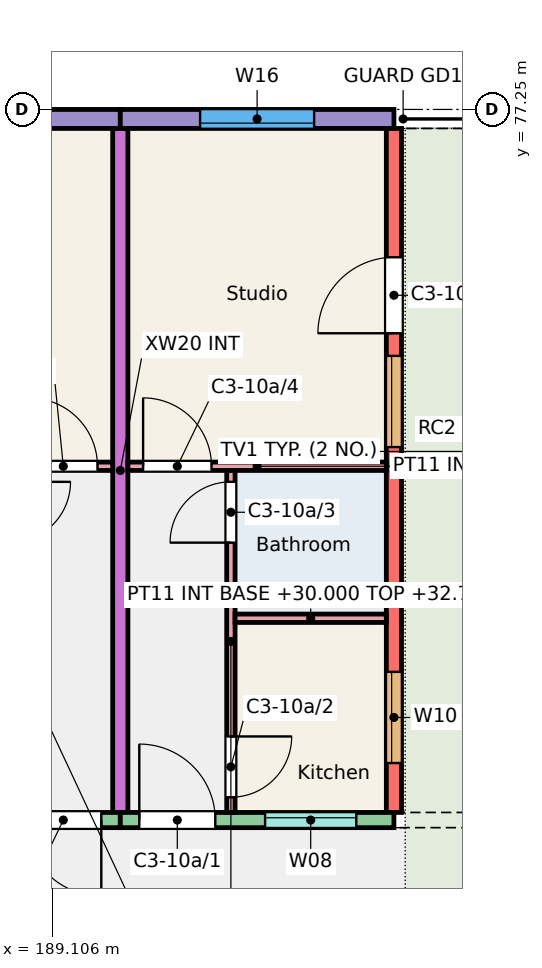
"""IFC4 building model, lengths in metres.
Left out: names, types, materials, properties, quantities, classifications, styles, units other than length and angle.
Written with IfcOpenShell. Run it as: python <this file> out.ifc"""

import sys

from ifc_helpers import new_model, si_unit, direction, frame, frame_2d, origin, place, context, subcontext, project, spatial, rectangle, extrude, element, fill, save


model = new_model("IFC4")
c1 = context("Model", 3, precision=1e-05, world=origin(), true_north=direction((0.0, 1.0)))
c2 = subcontext(c1, "Body", "Model", "MODEL_VIEW")
j1 = project(units=[si_unit("LENGTHUNIT", "METRE"), si_unit("PLANEANGLEUNIT", "RADIAN")], contexts=[c1])
p1 = place(None, origin())
s1 = spatial("IfcSite", under=j1, at=p1, CompositionType="ELEMENT")
p2 = place(p1, origin())
s2 = spatial("IfcBuilding", under=s1, at=p2, CompositionType="ELEMENT")
p3 = place(p2, frame((0.0, 0.0, 30.0)))
s3 = spatial("IfcBuildingStorey", under=s2, at=p3, CompositionType="ELEMENT", Elevation=30.0)
p4 = place(p3, frame((190.0, 68.0, 0.0), z_axis=(0.0, 0.0, 1.0), x_axis=(0.0, 1.0, 0.0)))
e1 = element("IfcWall", 1, at=p4, inside=s3, PredefinedType="SHEAR", context=c2, shape_type="SweptSolid", body=[
    extrude(rectangle(XDim=9.0, YDim=0.2, at=frame_2d((4.5, 0.0))), origin(), (0.0, 0.0, 1.0), 3.0),
])
p5 = place(p3, frame((193.6, 68.0, 0.0), z_axis=(0.0, 0.0, 1.0), x_axis=(0.0, 1.0, 0.0)))
e2 = element("IfcWall", 2, at=p5, inside=s3, PredefinedType="SHEAR", context=c2, shape_type="SweptSolid", body=[
    extrude(rectangle(XDim=9.0, YDim=0.2, at=frame_2d((4.5, 0.0))), origin(), (0.0, 0.0, 1.0), 3.0),
])
p6 = place(p5, frame((0.65, 0.0, 0.9)))
e3 = element("IfcOpeningElement", 3, at=p6, cuts=e2, PredefinedType="OPENING", context=c2, shape_type="SweptSolid", body=[
    extrude(rectangle(XDim=1.2, YDim=1.5, at=frame_2d((0.6, 0.75))), frame((0.0, 0.11, 0.0), z_axis=(0.0, -1.0, 0.0), x_axis=(1.0, 0.0, 0.0)), (0.0, 0.0, 1.0), 0.22),
])
p7 = place(p5, frame((4.808, 0.0, 0.9)))
e4 = element("IfcOpeningElement", 4, at=p7, cuts=e2, PredefinedType="OPENING", context=c2, shape_type="SweptSolid", body=[
    extrude(rectangle(XDim=1.2, YDim=1.5, at=frame_2d((0.6, 0.75))), frame((0.0, 0.11, 0.0), z_axis=(0.0, -1.0, 0.0), x_axis=(1.0, 0.0, 0.0)), (0.0, 0.0, 1.0), 0.22),
])
p8 = place(p5, frame((6.305, 0.0, 0.0)))
e5 = element("IfcOpeningElement", 5, at=p8, cuts=e2, PredefinedType="OPENING", context=c2, shape_type="SweptSolid", body=[
    extrude(rectangle(XDim=1.0, YDim=2.1, at=frame_2d((0.5, 1.05))), frame((0.0, 0.11, 0.0), z_axis=(0.0, -1.0, 0.0), x_axis=(1.0, 0.0, 0.0)), (0.0, 0.0, 1.0), 0.22),
])
p9 = place(p3, frame((186.4, 77.125, 0.0), z_axis=(0.0, 0.0, 1.0), x_axis=(1.0, 0.0, 0.0)))
e6 = element("IfcWall", 6, at=p9, inside=s3, PredefinedType="SOLIDWALL", context=c2, shape_type="SweptSolid", body=[
    extrude(rectangle(XDim=3.6, YDim=0.25, at=frame_2d((1.8, 0.0))), origin(), (0.0, 0.0, 1.0), 3.0),
])
p10 = place(p9, frame((1.062, 0.0, 0.9)))
e7 = element("IfcOpeningElement", 7, at=p10, cuts=e6, PredefinedType="OPENING", context=c2, shape_type="SweptSolid", body=[
    extrude(rectangle(XDim=1.5, YDim=1.5, at=frame_2d((0.75, 0.75))), frame((0.0, 0.135, 0.0), z_axis=(0.0, -1.0, 0.0), x_axis=(1.0, 0.0, 0.0)), (0.0, 0.0, 1.0), 0.27),
])
p11 = place(p3, frame((186.4, 67.9, 0.0), z_axis=(0.0, 0.0, 1.0), x_axis=(1.0, 0.0, 0.0)))
e8 = element("IfcWall", 8, at=p11, inside=s3, PredefinedType="SOLIDWALL", context=c2, shape_type="SweptSolid", body=[
    extrude(rectangle(XDim=3.6, YDim=0.2, at=frame_2d((1.8, 0.0))), origin(), (0.0, 0.0, 1.0), 3.0),
])
p12 = place(p11, frame((0.508, 0.0, 1.1)))
e9 = element("IfcOpeningElement", 9, at=p12, cuts=e8, PredefinedType="OPENING", context=c2, shape_type="SweptSolid", body=[
    extrude(rectangle(XDim=1.2, YDim=1.3, at=frame_2d((0.6, 0.65))), frame((0.0, 0.11, 0.0), z_axis=(0.0, -1.0, 0.0), x_axis=(1.0, 0.0, 0.0)), (0.0, 0.0, 1.0), 0.22),
])
p13 = place(p11, frame((2.35, 0.0, 0.0)))
e10 = element("IfcOpeningElement", 10, at=p13, cuts=e8, PredefinedType="OPENING", context=c2, shape_type="SweptSolid", body=[
    extrude(rectangle(XDim=1.0, YDim=2.1, at=frame_2d((0.5, 1.05))), frame((0.0, 0.11, 0.0), z_axis=(0.0, -1.0, 0.0), x_axis=(1.0, 0.0, 0.0)), (0.0, 0.0, 1.0), 0.22),
])
p14 = place(p3, frame((190.0, 77.125, 0.0), z_axis=(0.0, 0.0, 1.0), x_axis=(1.0, 0.0, 0.0)))
e11 = element("IfcWall", 11, at=p14, inside=s3, PredefinedType="SOLIDWALL", context=c2, shape_type="SweptSolid", body=[
    extrude(rectangle(XDim=3.6, YDim=0.25, at=frame_2d((1.8, 0.0))), origin(), (0.0, 0.0, 1.0), 3.0),
])
p15 = place(p14, frame((1.05, 0.0, 0.9)))
e12 = element("IfcOpeningElement", 12, at=p15, cuts=e11, PredefinedType="OPENING", context=c2, shape_type="SweptSolid", body=[
    extrude(rectangle(XDim=1.5, YDim=1.5, at=frame_2d((0.75, 0.75))), frame((0.0, 0.135, 0.0), z_axis=(0.0, -1.0, 0.0), x_axis=(1.0, 0.0, 0.0)), (0.0, 0.0, 1.0), 0.27),
])
p16 = place(p3, frame((190.0, 67.9, 0.0), z_axis=(0.0, 0.0, 1.0), x_axis=(1.0, 0.0, 0.0)))
e13 = element("IfcWall", 13, at=p16, inside=s3, PredefinedType="SOLIDWALL", context=c2, shape_type="SweptSolid", body=[
    extrude(rectangle(XDim=3.6, YDim=0.2, at=frame_2d((1.8, 0.0))), origin(), (0.0, 0.0, 1.0), 3.0),
])
p17 = place(p16, frame((1.905, 0.0, 1.1)))
e14 = element("IfcOpeningElement", 14, at=p17, cuts=e13, PredefinedType="OPENING", context=c2, shape_type="SweptSolid", body=[
    extrude(rectangle(XDim=1.2, YDim=1.3, at=frame_2d((0.6, 0.65))), frame((0.0, 0.11, 0.0), z_axis=(0.0, -1.0, 0.0), x_axis=(1.0, 0.0, 0.0)), (0.0, 0.0, 1.0), 0.22),
])
p18 = place(p16, frame((0.25, 0.0, 0.0)))
e15 = element("IfcOpeningElement", 15, at=p18, cuts=e13, PredefinedType="OPENING", context=c2, shape_type="SweptSolid", body=[
    extrude(rectangle(XDim=1.0, YDim=2.1, at=frame_2d((0.5, 1.05))), frame((0.0, 0.11, 0.0), z_axis=(0.0, -1.0, 0.0), x_axis=(1.0, 0.0, 0.0)), (0.0, 0.0, 1.0), 0.22),
])
p19 = place(p3, frame((191.455, 68.0, 0.0), z_axis=(0.0, 0.0, 1.0), x_axis=(0.0, 1.0, 0.0)))
e16 = element("IfcWall", 16, at=p19, inside=s3, PredefinedType="PARTITIONING", context=c2, shape_type="SweptSolid", body=[
    extrude(rectangle(XDim=4.5, YDim=0.11, at=frame_2d((2.25, 0.0))), origin(), (0.0, 0.0, 1.0), 2.75),
])
p20 = place(p19, frame((0.2, 0.0, 0.0)))
e17 = element("IfcOpeningElement", 17, at=p20, cuts=e16, PredefinedType="OPENING", context=c2, shape_type="SweptSolid", body=[
    extrude(rectangle(XDim=0.8, YDim=2.1, at=frame_2d((0.4, 1.05))), frame((0.0, 0.065, 0.0), z_axis=(0.0, -1.0, 0.0), x_axis=(1.0, 0.0, 0.0)), (0.0, 0.0, 1.0), 0.13),
])
p21 = place(p19, frame((3.55, 0.0, 0.0)))
e18 = element("IfcOpeningElement", 18, at=p21, cuts=e16, PredefinedType="OPENING", context=c2, shape_type="SweptSolid", body=[
    extrude(rectangle(XDim=0.8, YDim=2.1, at=frame_2d((0.4, 1.05))), frame((0.0, 0.065, 0.0), z_axis=(0.0, -1.0, 0.0), x_axis=(1.0, 0.0, 0.0)), (0.0, 0.0, 1.0), 0.13),
])
p22 = place(p3, frame((191.51, 70.555, 0.0), z_axis=(0.0, 0.0, 1.0), x_axis=(1.0, 0.0, 0.0)))
e19 = element("IfcWall", 19, at=p22, inside=s3, PredefinedType="PARTITIONING", context=c2, shape_type="SweptSolid", body=[
    extrude(rectangle(XDim=1.99, YDim=0.11, at=frame_2d((0.995, 0.0))), origin(), (0.0, 0.0, 1.0), 2.75),
])
p23 = place(p3, frame((190.1, 72.555, 0.0), z_axis=(0.0, 0.0, 1.0), x_axis=(1.0, 0.0, 0.0)))
e20 = element("IfcWall", 20, at=p23, inside=s3, PredefinedType="PARTITIONING", context=c2, shape_type="SweptSolid", body=[
    extrude(rectangle(XDim=3.4, YDim=0.11, at=frame_2d((1.7, 0.0))), origin(), (0.0, 0.0, 1.0), 2.75),
])
p24 = place(p23, frame((0.2, 0.0, 0.0)))
e21 = element("IfcOpeningElement", 21, at=p24, cuts=e20, PredefinedType="OPENING", context=c2, shape_type="SweptSolid", body=[
    extrude(rectangle(XDim=0.9, YDim=2.1, at=frame_2d((0.45, 1.05))), frame((0.0, 0.065, 0.0), z_axis=(0.0, -1.0, 0.0), x_axis=(1.0, 0.0, 0.0)), (0.0, 0.0, 1.0), 0.13),
])
p25 = place(p3, frame((186.525, 72.555, 0.0), z_axis=(0.0, 0.0, 1.0), x_axis=(1.0, 0.0, 0.0)))
e22 = element("IfcWall", 22, at=p25, inside=s3, PredefinedType="PARTITIONING", context=c2, shape_type="SweptSolid", body=[
    extrude(rectangle(XDim=3.375, YDim=0.11, at=frame_2d((1.688, 0.0))), origin(), (0.0, 0.0, 1.0), 2.8),
])
p26 = place(p25, frame((2.275, 0.0, 0.0)))
e23 = element("IfcOpeningElement", 23, at=p26, cuts=e22, PredefinedType="OPENING", context=c2, shape_type="SweptSolid", body=[
    extrude(rectangle(XDim=0.9, YDim=2.1, at=frame_2d((0.45, 1.05))), frame((0.0, 0.065, 0.0), z_axis=(0.0, -1.0, 0.0), x_axis=(1.0, 0.0, 0.0)), (0.0, 0.0, 1.0), 0.13),
])
p27 = place(p17, origin())
e24 = element("IfcWindow", 24, at=p27, inside=s3, PartitioningType="SINGLE_PANEL", PredefinedType="WINDOW", context=c2, shape_type="SweptSolid", body=[
    extrude(rectangle(XDim=1.2, YDim=1.3, at=frame_2d((0.6, 0.65))), frame((0.0, 0.06, 0.0), z_axis=(0.0, -1.0, 0.0), x_axis=(1.0, 0.0, 0.0)), (0.0, 0.0, 1.0), 0.06),
])
fill(e14, e24)
p28 = place(p15, origin())
e25 = element("IfcWindow", 25, at=p28, inside=s3, PartitioningType="SINGLE_PANEL", PredefinedType="WINDOW", context=c2, shape_type="SweptSolid", body=[
    extrude(rectangle(XDim=1.5, YDim=1.5, at=frame_2d((0.75, 0.75))), frame((0.0, -0.025, 0.0), z_axis=(0.0, -1.0, 0.0), x_axis=(1.0, 0.0, 0.0)), (0.0, 0.0, 1.0), 0.06),
])
fill(e12, e25)
p29 = place(p6, origin())
e26 = element("IfcWindow", 26, at=p29, inside=s3, PartitioningType="SINGLE_PANEL", PredefinedType="WINDOW", context=c2, shape_type="SweptSolid", body=[
    extrude(rectangle(XDim=1.2, YDim=1.5, at=frame_2d((0.6, 0.75))), frame((0.0, 0.06, 0.0), z_axis=(0.0, -1.0, 0.0), x_axis=(1.0, 0.0, 0.0)), (0.0, 0.0, 1.0), 0.06),
])
fill(e3, e26)
p30 = place(p7, origin())
e27 = element("IfcWindow", 27, at=p30, inside=s3, PartitioningType="SINGLE_PANEL", PredefinedType="WINDOW", context=c2, shape_type="SweptSolid", body=[
    extrude(rectangle(XDim=1.2, YDim=1.5, at=frame_2d((0.6, 0.75))), frame((0.0, 0.06, 0.0), z_axis=(0.0, -1.0, 0.0), x_axis=(1.0, 0.0, 0.0)), (0.0, 0.0, 1.0), 0.06),
])
fill(e4, e27)
p31 = place(p18, origin())
e28 = element("IfcDoor", 28, at=p31, inside=s3, OperationType="SINGLE_SWING_LEFT", PredefinedType="DOOR", context=c2, shape_type="SweptSolid", body=[
    extrude(rectangle(XDim=1.0, YDim=2.1, at=frame_2d((0.5, 1.05))), frame((0.0, 0.025, 0.0), z_axis=(0.0, -1.0, 0.0), x_axis=(1.0, 0.0, 0.0)), (0.0, 0.0, 1.0), 0.05),
])
fill(e15, e28)
p32 = place(p20, origin())
e29 = element("IfcDoor", 29, at=p32, inside=s3, OperationType="SINGLE_SWING_RIGHT", PredefinedType="DOOR", context=c2, shape_type="SweptSolid", body=[
    extrude(rectangle(XDim=0.8, YDim=2.1, at=frame_2d((0.4, 1.05))), frame((0.0, 0.025, 0.0), z_axis=(0.0, -1.0, 0.0), x_axis=(1.0, 0.0, 0.0)), (0.0, 0.0, 1.0), 0.05),
])
fill(e17, e29)
p33 = place(p21, origin())
e30 = element("IfcDoor", 30, at=p33, inside=s3, OperationType="SINGLE_SWING_LEFT", PredefinedType="DOOR", context=c2, shape_type="SweptSolid", body=[
    extrude(rectangle(XDim=0.8, YDim=2.1, at=frame_2d((0.4, 1.05))), frame((0.0, 0.025, 0.0), z_axis=(0.0, -1.0, 0.0), x_axis=(1.0, 0.0, 0.0)), (0.0, 0.0, 1.0), 0.05),
])
fill(e18, e30)
p34 = place(p24, origin())
e31 = element("IfcDoor", 31, at=p34, inside=s3, OperationType="SINGLE_SWING_LEFT", PredefinedType="DOOR", context=c2, shape_type="SweptSolid", body=[
    extrude(rectangle(XDim=0.9, YDim=2.1, at=frame_2d((0.45, 1.05))), frame((0.0, 0.025, 0.0), z_axis=(0.0, -1.0, 0.0), x_axis=(1.0, 0.0, 0.0)), (0.0, 0.0, 1.0), 0.05),
])
fill(e21, e31)
p35 = place(p8, origin())
e32 = element("IfcDoor", 32, at=p35, inside=s3, OperationType="SINGLE_SWING_LEFT", PredefinedType="DOOR", context=c2, shape_type="SweptSolid", body=[
    extrude(rectangle(XDim=1.0, YDim=2.1, at=frame_2d((0.5, 1.05))), frame((0.0, 0.025, 0.0), z_axis=(0.0, -1.0, 0.0), x_axis=(1.0, 0.0, 0.0)), (0.0, 0.0, 1.0), 0.05),
])
fill(e5, e32)
p36 = place(p13, origin())
e33 = element("IfcDoor", 33, at=p36, inside=s3, OperationType="SINGLE_SWING_RIGHT", PredefinedType="DOOR", context=c2, shape_type="SweptSolid", body=[
    extrude(rectangle(XDim=1.0, YDim=2.1, at=frame_2d((0.5, 1.05))), frame((0.0, 0.025, 0.0), z_axis=(0.0, -1.0, 0.0), x_axis=(1.0, 0.0, 0.0)), (0.0, 0.0, 1.0), 0.05),
])
fill(e10, e33)
p37 = place(p26, origin())
e34 = element("IfcDoor", 34, at=p37, inside=s3, OperationType="SINGLE_SWING_LEFT", PredefinedType="DOOR", context=c2, shape_type="SweptSolid", body=[
    extrude(rectangle(XDim=0.9, YDim=2.1, at=frame_2d((0.45, 1.05))), frame((0.0, 0.025, 0.0), z_axis=(0.0, -1.0, 0.0), x_axis=(1.0, 0.0, 0.0)), (0.0, 0.0, 1.0), 0.05),
])
fill(e23, e34)
save(model, sys.argv[1])
